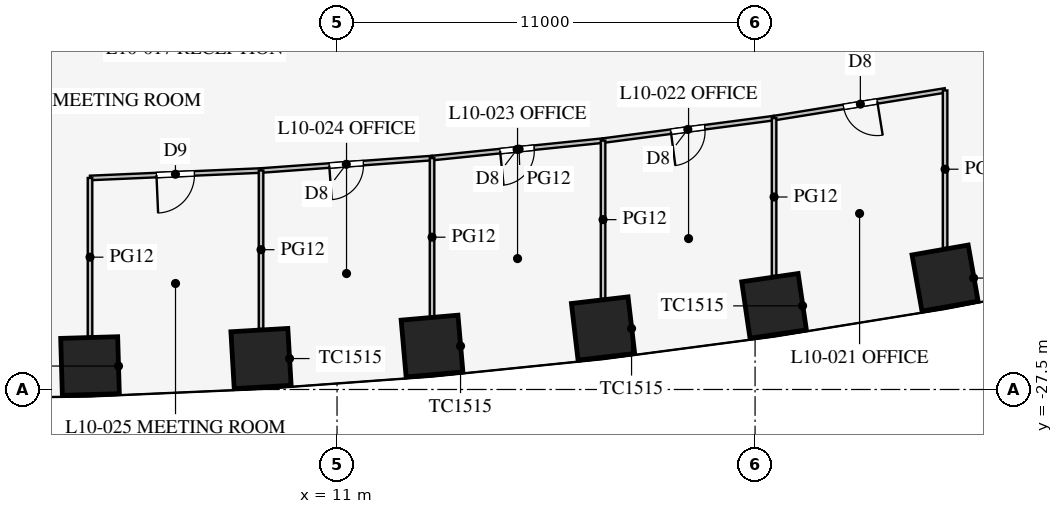
"""IFC4 building model, lengths in metres.
Left out: names, types, materials, properties, quantities, classifications, styles, units other than length and angle.
Written with IfcOpenShell. Run it as: python <this file> out.ifc"""

import sys

from ifc_helpers import new_model, si_unit, direction, frame, frame_2d, origin, origin_2d, place, context, subcontext, project, spatial, rectangle, extrude, element, fill, save


model = new_model("IFC4")
c1 = context("Model", 3, precision=1e-05, world=origin(), true_north=direction((0.0, 1.0)))
c2 = subcontext(c1, "Body", "Model", "MODEL_VIEW")
j1 = project(units=[si_unit("LENGTHUNIT", "METRE"), si_unit("PLANEANGLEUNIT", "RADIAN")], contexts=[c1])
p1 = place(None, origin())
s1 = spatial("IfcSite", under=j1, at=p1, CompositionType="ELEMENT")
p2 = place(p1, origin())
s2 = spatial("IfcBuilding", under=s1, at=p2, CompositionType="ELEMENT")
p3 = place(p2, frame((0.0, 0.0, 45.9)))
s3 = spatial("IfcBuildingStorey", under=s2, at=p3, CompositionType="ELEMENT", Elevation=45.9)
for number, where, z_axis, x_axis in (
    (1, (4.5, -26.883, 0.0), (0.0, 0.0, 1.0), (1.0, 0.029, 0.0)),
    (2, (9.0, -26.686, 0.0), (0.0, 0.0, 1.0), (0.998, 0.058, 0.0)),
    (3, (13.5, -26.357, 0.0), (0.0, 0.0, 1.0), (0.996, 0.087, 0.0)),
    (4, (18.0, -25.895, 0.0), (0.0, 0.0, 1.0), (0.993, 0.116, 0.0)),
    (5, (22.5, -25.299, 0.0), (0.0, 0.0, 1.0), (0.989, 0.145, 0.0)),
    (6, (27.0, -24.568, 0.0), (0.0, 0.0, 1.0), (0.985, 0.174, 0.0)),
):
    element("IfcColumn", number, at=place(p3, frame(where, z_axis=z_axis, x_axis=x_axis)), inside=s3, PredefinedType="COLUMN", context=c2, shape_type="SweptSolid", body=[
        extrude(rectangle(XDim=1.5, YDim=1.5, at=origin_2d()), origin(), (0.0, 0.0, 1.0), 4.2),
    ])
p4 = place(p3, frame((13.5, -21.41, 0.0), z_axis=(0.0, 0.0, 1.0), x_axis=(0.994833141332, 0.101523499286, 0.0)))
e7 = element("IfcWall", 7, at=p4, inside=s3, PredefinedType="PARTITIONING", context=c2, shape_type="SweptSolid", body=[
    extrude(rectangle(XDim=4.523, YDim=0.12, at=frame_2d((2.262, 0.0))), origin(), (0.0, 0.0, 1.0), 2.9),
])
p5 = place(p4, frame((1.8, 0.0, 0.15)))
e8 = element("IfcOpeningElement", 8, at=p5, cuts=e7, PredefinedType="OPENING", context=c2, shape_type="SweptSolid", body=[
    extrude(rectangle(XDim=0.9, YDim=2.1, at=frame_2d((0.45, 1.05))), frame((0.0, 0.07, 0.0), z_axis=(0.0, -1.0, 0.0), x_axis=(1.0, 0.0, 0.0)), (0.0, 0.0, 1.0), 0.14),
])
p6 = place(p3, frame((18.0, -20.951, 0.0), z_axis=(0.0, 0.0, 1.0), x_axis=(0.991435244698, 0.130599217346, 0.0)))
e9 = element("IfcWall", 9, at=p6, inside=s3, PredefinedType="PARTITIONING", context=c2, shape_type="SweptSolid", body=[
    extrude(rectangle(XDim=4.539, YDim=0.12, at=frame_2d((2.27, 0.0))), origin(), (0.0, 0.0, 1.0), 2.9),
])
p7 = place(p6, frame((1.8, 0.0, 0.15)))
e10 = element("IfcOpeningElement", 10, at=p7, cuts=e9, PredefinedType="OPENING", context=c2, shape_type="SweptSolid", body=[
    extrude(rectangle(XDim=0.9, YDim=2.1, at=frame_2d((0.45, 1.05))), frame((0.0, 0.07, 0.0), z_axis=(0.0, -1.0, 0.0), x_axis=(1.0, 0.0, 0.0)), (0.0, 0.0, 1.0), 0.14),
])
p8 = place(p3, frame((22.5, -20.358, 0.0), z_axis=(0.0, 0.0, 1.0), x_axis=(0.987181300889, 0.159602879593, 0.0)))
e11 = element("IfcWall", 11, at=p8, inside=s3, PredefinedType="PARTITIONING", context=c2, shape_type="SweptSolid", body=[
    extrude(rectangle(XDim=4.558, YDim=0.12, at=frame_2d((2.279, 0.0))), origin(), (0.0, 0.0, 1.0), 2.9),
])
p9 = place(p8, frame((1.85, 0.0, 0.15)))
e12 = element("IfcOpeningElement", 12, at=p9, cuts=e11, PredefinedType="OPENING", context=c2, shape_type="SweptSolid", body=[
    extrude(rectangle(XDim=0.9, YDim=2.1, at=frame_2d((0.45, 1.05))), frame((0.0, 0.07, 0.0), z_axis=(0.0, -1.0, 0.0), x_axis=(1.0, 0.0, 0.0)), (0.0, 0.0, 1.0), 0.14),
])
p10 = place(p3, frame((4.5, -21.933, 0.0), z_axis=(0.0, 0.0, 1.0), x_axis=(0.999052370647, 0.043524254212, 0.0)))
e13 = element("IfcWall", 13, at=p10, inside=s3, PredefinedType="PARTITIONING", context=c2, shape_type="SweptSolid", body=[
    extrude(rectangle(XDim=4.504, YDim=0.12, at=frame_2d((2.252, 0.0))), origin(), (0.0, 0.0, 1.0), 2.9),
])
p11 = place(p10, frame((1.75, 0.0, 0.15)))
e14 = element("IfcOpeningElement", 14, at=p11, cuts=e13, PredefinedType="OPENING", context=c2, shape_type="SweptSolid", body=[
    extrude(rectangle(XDim=1.0, YDim=2.1, at=frame_2d((0.5, 1.05))), frame((0.0, 0.07, 0.0), z_axis=(0.0, -1.0, 0.0), x_axis=(1.0, 0.0, 0.0)), (0.0, 0.0, 1.0), 0.14),
])
p12 = place(p3, frame((9.0, -21.737, 0.0), z_axis=(0.0, 0.0, 1.0), x_axis=(0.997363894896, 0.072562119306, 0.0)))
e15 = element("IfcWall", 15, at=p12, inside=s3, PredefinedType="PARTITIONING", context=c2, shape_type="SweptSolid", body=[
    extrude(rectangle(XDim=4.512, YDim=0.12, at=frame_2d((2.256, 0.0))), origin(), (0.0, 0.0, 1.0), 2.9),
])
p13 = place(p12, frame((1.8, 0.0, 0.15)))
e16 = element("IfcOpeningElement", 16, at=p13, cuts=e15, PredefinedType="OPENING", context=c2, shape_type="SweptSolid", body=[
    extrude(rectangle(XDim=0.9, YDim=2.1, at=frame_2d((0.45, 1.05))), frame((0.0, 0.07, 0.0), z_axis=(0.0, -1.0, 0.0), x_axis=(1.0, 0.0, 0.0)), (0.0, 0.0, 1.0), 0.14),
])
p14 = place(p3, frame((13.5, -21.41, 0.0), z_axis=(0.0, 0.0, 1.0), x_axis=(0.0, -1.0, 0.0)))
e17 = element("IfcWall", 17, at=p14, inside=s3, PredefinedType="PARTITIONING", context=c2, shape_type="SweptSolid", body=[
    extrude(rectangle(XDim=4.164, YDim=0.12, at=frame_2d((2.082, 0.0))), origin(), (0.0, 0.0, 1.0), 2.9),
])
p15 = place(p3, frame((18.0, -20.951, 0.0), z_axis=(0.0, 0.0, 1.0), x_axis=(0.0, -1.0, 0.0)))
e18 = element("IfcWall", 18, at=p15, inside=s3, PredefinedType="PARTITIONING", context=c2, shape_type="SweptSolid", body=[
    extrude(rectangle(XDim=4.159, YDim=0.12, at=frame_2d((2.08, 0.0))), origin(), (0.0, 0.0, 1.0), 2.9),
])
p16 = place(p3, frame((22.5, -20.358, 0.0), z_axis=(0.0, 0.0, 1.0), x_axis=(0.0, -1.0, 0.0)))
e19 = element("IfcWall", 19, at=p16, inside=s3, PredefinedType="PARTITIONING", context=c2, shape_type="SweptSolid", body=[
    extrude(rectangle(XDim=4.153, YDim=0.12, at=frame_2d((2.077, 0.0))), origin(), (0.0, 0.0, 1.0), 2.9),
])
p17 = place(p3, frame((27.0, -19.63, 0.0), z_axis=(0.0, 0.0, 1.0), x_axis=(0.0, -1.0, 0.0)))
e20 = element("IfcWall", 20, at=p17, inside=s3, PredefinedType="PARTITIONING", context=c2, shape_type="SweptSolid", body=[
    extrude(rectangle(XDim=4.146, YDim=0.12, at=frame_2d((2.073, 0.0))), origin(), (0.0, 0.0, 1.0), 2.9),
])
p18 = place(p3, frame((4.5, -21.933, 0.0), z_axis=(0.0, 0.0, 1.0), x_axis=(0.0, -1.0, 0.0)))
e21 = element("IfcWall", 21, at=p18, inside=s3, PredefinedType="PARTITIONING", context=c2, shape_type="SweptSolid", body=[
    extrude(rectangle(XDim=4.169, YDim=0.12, at=frame_2d((2.085, 0.0))), origin(), (0.0, 0.0, 1.0), 2.9),
])
p19 = place(p3, frame((9.0, -21.737, 0.0), z_axis=(0.0, 0.0, 1.0), x_axis=(0.0, -1.0, 0.0)))
e22 = element("IfcWall", 22, at=p19, inside=s3, PredefinedType="PARTITIONING", context=c2, shape_type="SweptSolid", body=[
    extrude(rectangle(XDim=4.167, YDim=0.12, at=frame_2d((2.084, 0.0))), origin(), (0.0, 0.0, 1.0), 2.9),
])
p20 = place(p9, frame((0.9, 0.0, 0.0), z_axis=(0.0, 0.0, 1.0), x_axis=(-1.0, 0.0, 0.0)))
e23 = element("IfcDoor", 23, at=p20, inside=s3, OperationType="SINGLE_SWING_LEFT", PredefinedType="DOOR", context=c2, shape_type="SweptSolid", body=[
    extrude(rectangle(XDim=0.9, YDim=2.1, at=frame_2d((0.45, 1.05))), frame((0.0, 0.025, 0.0), z_axis=(0.0, -1.0, 0.0), x_axis=(1.0, 0.0, 0.0)), (0.0, 0.0, 1.0), 0.05),
])
fill(e12, e23)
p21 = place(p7, frame((0.9, 0.0, 0.0), z_axis=(0.0, 0.0, 1.0), x_axis=(-1.0, 0.0, 0.0)))
e24 = element("IfcDoor", 24, at=p21, inside=s3, OperationType="SINGLE_SWING_RIGHT", PredefinedType="DOOR", context=c2, shape_type="SweptSolid", body=[
    extrude(rectangle(XDim=0.9, YDim=2.1, at=frame_2d((0.45, 1.05))), frame((0.0, 0.025, 0.0), z_axis=(0.0, -1.0, 0.0), x_axis=(1.0, 0.0, 0.0)), (0.0, 0.0, 1.0), 0.05),
])
fill(e10, e24)
p22 = place(p5, frame((0.9, 0.0, 0.0), z_axis=(0.0, 0.0, 1.0), x_axis=(-1.0, 0.0, 0.0)))
e25 = element("IfcDoor", 25, at=p22, inside=s3, OperationType="SINGLE_SWING_RIGHT", PredefinedType="DOOR", context=c2, shape_type="SweptSolid", body=[
    extrude(rectangle(XDim=0.9, YDim=2.1, at=frame_2d((0.45, 1.05))), frame((0.0, 0.025, 0.0), z_axis=(0.0, -1.0, 0.0), x_axis=(1.0, 0.0, 0.0)), (0.0, 0.0, 1.0), 0.05),
])
fill(e8, e25)
p23 = place(p13, frame((0.9, 0.0, 0.0), z_axis=(0.0, 0.0, 1.0), x_axis=(-1.0, 0.0, 0.0)))
e26 = element("IfcDoor", 26, at=p23, inside=s3, OperationType="SINGLE_SWING_RIGHT", PredefinedType="DOOR", context=c2, shape_type="SweptSolid", body=[
    extrude(rectangle(XDim=0.9, YDim=2.1, at=frame_2d((0.45, 1.05))), frame((0.0, 0.025, 0.0), z_axis=(0.0, -1.0, 0.0), x_axis=(1.0, 0.0, 0.0)), (0.0, 0.0, 1.0), 0.05),
])
fill(e16, e26)
p24 = place(p11, frame((1.0, 0.0, 0.0), z_axis=(0.0, 0.0, 1.0), x_axis=(-1.0, 0.0, 0.0)))
e27 = element("IfcDoor", 27, at=p24, inside=s3, OperationType="SINGLE_SWING_RIGHT", PredefinedType="DOOR", context=c2, shape_type="SweptSolid", body=[
    extrude(rectangle(XDim=1.0, YDim=2.1, at=frame_2d((0.5, 1.05))), frame((0.0, 0.025, 0.0), z_axis=(0.0, -1.0, 0.0), x_axis=(1.0, 0.0, 0.0)), (0.0, 0.0, 1.0), 0.05),
])
fill(e14, e27)
save(model, sys.argv[1])
